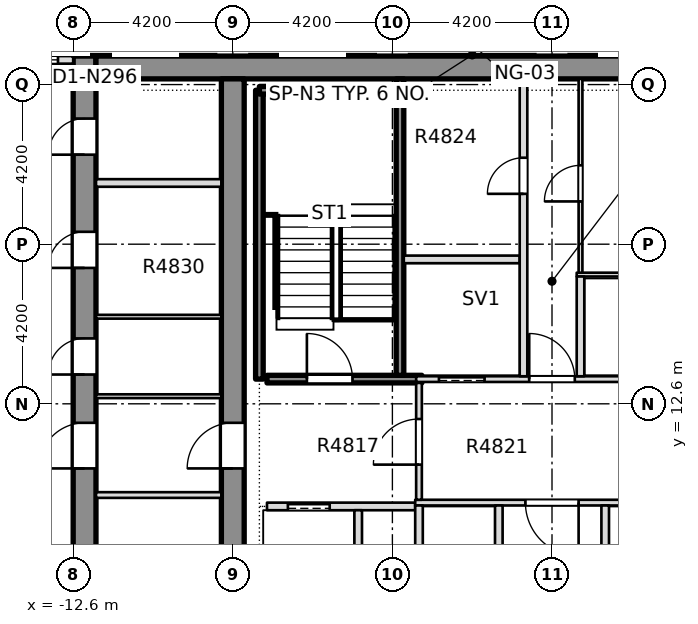
"""IFC4 building model, lengths in metres.
Left out: names, types, materials, properties, quantities, classifications, styles, units other than length and angle.
Written with IfcOpenShell. Run it as: python <this file> out.ifc"""

import sys

from ifc_helpers import new_model, si_unit, direction, frame, frame_2d, origin, place, context, subcontext, project, spatial, rectangle, extrude, element, fill, save


model = new_model("IFC4")
c1 = context("Model", 3, precision=1e-05, world=origin(), true_north=direction((0.0, 1.0)))
c2 = subcontext(c1, "Body", "Model", "MODEL_VIEW")
j1 = project(units=[si_unit("LENGTHUNIT", "METRE"), si_unit("PLANEANGLEUNIT", "RADIAN")], contexts=[c1])
p1 = place(None, origin())
s1 = spatial("IfcSite", under=j1, at=p1, CompositionType="ELEMENT")
p2 = place(p1, origin())
s2 = spatial("IfcBuilding", under=s1, at=p2, CompositionType="ELEMENT")
p3 = place(p2, frame((0.0, 0.0, 185.9)))
s3 = spatial("IfcBuildingStorey", under=s2, at=p3, CompositionType="ELEMENT", Elevation=185.9)
p4 = place(p3, frame((-12.3, -8.4, -0.4), z_axis=(0.0, 0.0, 1.0), x_axis=(0.0, 1.0, 0.0)))
e1 = element("IfcWall", 1, at=p4, inside=s3, PredefinedType="SHEAR", context=c2, shape_type="SweptSolid", body=[
    extrude(rectangle(XDim=30.15, YDim=0.6, at=frame_2d((15.075, 0.0))), origin(), (0.0, 0.0, 1.0), 3.45),
])
p5 = place(p4, frame((4.788, 0.0, 0.4)))
e2 = element("IfcOpeningElement", 2, at=p5, cuts=e1, PredefinedType="OPENING", context=c2, shape_type="SweptSolid", body=[
    extrude(rectangle(XDim=0.95, YDim=2.1, at=frame_2d((0.475, 1.05))), frame((0.0, 0.31, 0.0), z_axis=(0.0, -1.0, 0.0), x_axis=(1.0, 0.0, 0.0)), (0.0, 0.0, 1.0), 0.62),
])
p6 = place(p4, frame((13.638, 0.0, 0.4)))
e3 = element("IfcOpeningElement", 3, at=p6, cuts=e1, PredefinedType="OPENING", context=c2, shape_type="SweptSolid", body=[
    extrude(rectangle(XDim=0.95, YDim=2.1, at=frame_2d((0.475, 1.05))), frame((0.0, 0.31, 0.0), z_axis=(0.0, -1.0, 0.0), x_axis=(1.0, 0.0, 0.0)), (0.0, 0.0, 1.0), 0.62),
])
p7 = place(p4, frame((21.771, 0.0, 0.4)))
e4 = element("IfcOpeningElement", 4, at=p7, cuts=e1, PredefinedType="OPENING", context=c2, shape_type="SweptSolid", body=[
    extrude(rectangle(XDim=0.95, YDim=2.1, at=frame_2d((0.475, 1.05))), frame((0.0, 0.31, 0.0), z_axis=(0.0, -1.0, 0.0), x_axis=(1.0, 0.0, 0.0)), (0.0, 0.0, 1.0), 0.62),
])
p8 = place(p4, frame((24.576, 0.0, 0.4)))
e5 = element("IfcOpeningElement", 5, at=p8, cuts=e1, PredefinedType="OPENING", context=c2, shape_type="SweptSolid", body=[
    extrude(rectangle(XDim=0.95, YDim=2.1, at=frame_2d((0.475, 1.05))), frame((0.0, 0.31, 0.0), z_axis=(0.0, -1.0, 0.0), x_axis=(1.0, 0.0, 0.0)), (0.0, 0.0, 1.0), 0.62),
])
p9 = place(p4, frame((27.555, 0.0, 0.4)))
e6 = element("IfcOpeningElement", 6, at=p9, cuts=e1, PredefinedType="OPENING", context=c2, shape_type="SweptSolid", body=[
    extrude(rectangle(XDim=0.95, YDim=2.1, at=frame_2d((0.475, 1.05))), frame((0.0, 0.31, 0.0), z_axis=(0.0, -1.0, 0.0), x_axis=(1.0, 0.0, 0.0)), (0.0, 0.0, 1.0), 0.62),
])
p10 = place(p4, frame((19.3, 0.0, 0.4)))
e7 = element("IfcOpeningElement", 7, at=p10, cuts=e1, PredefinedType="OPENING", context=c2, shape_type="SweptSolid", body=[
    extrude(rectangle(XDim=1.2, YDim=2.1, at=frame_2d((0.6, 1.05))), frame((0.0, 0.31, 0.0), z_axis=(0.0, -1.0, 0.0), x_axis=(1.0, 0.0, 0.0)), (0.0, 0.0, 1.0), 0.62),
])
p11 = place(p3, frame((-12.0, 21.45, -0.4), z_axis=(0.0, 0.0, 1.0), x_axis=(1.0, 0.0, 0.0)))
e8 = element("IfcWall", 8, at=p11, inside=s3, PredefinedType="SHEAR", context=c2, shape_type="SweptSolid", body=[
    extrude(rectangle(XDim=24.0, YDim=0.6, at=frame_2d((12.0, 0.0))), origin(), (0.0, 0.0, 1.0), 3.45),
])
p12 = place(p3, frame((-8.4, -7.8, -0.4), z_axis=(0.0, 0.0, 1.0), x_axis=(0.0, 1.0, 0.0)))
e9 = element("IfcWall", 9, at=p12, inside=s3, PredefinedType="SHEAR", context=c2, shape_type="SweptSolid", body=[
    extrude(rectangle(XDim=28.95, YDim=0.6, at=frame_2d((14.475, 0.0))), origin(), (0.0, 0.0, 1.0), 3.45),
])
p13 = place(p12, frame((18.7, 0.0, 0.4)))
e10 = element("IfcOpeningElement", 10, at=p13, cuts=e9, PredefinedType="OPENING", context=c2, shape_type="SweptSolid", body=[
    extrude(rectangle(XDim=1.2, YDim=2.1, at=frame_2d((0.6, 1.05))), frame((0.0, 0.31, 0.0), z_axis=(0.0, -1.0, 0.0), x_axis=(1.0, 0.0, 0.0)), (0.0, 0.0, 1.0), 0.62),
])
p14 = place(p3, frame((-12.6, 21.65, 0.0), z_axis=(0.0, 0.0, 1.0), x_axis=(-1.0, 0.0, 0.0)))
e11 = element("IfcWall", 11, at=p14, inside=s3, PredefinedType="STANDARD", context=c2, shape_type="SweptSolid", body=[
    extrude(rectangle(XDim=3.7, YDim=0.2, at=frame_2d((1.85, 0.0))), origin(), (0.0, 0.0, 1.0), 3.05),
])
p15 = place(p14, frame((0.4, 0.0, 0.2)))
e12 = element("IfcOpeningElement", 12, at=p15, cuts=e11, PredefinedType="OPENING", context=c2, shape_type="SweptSolid", body=[
    extrude(rectangle(XDim=1.8, YDim=2.65, at=frame_2d((0.9, 1.325))), frame((0.0, 0.11, 0.0), z_axis=(0.0, -1.0, 0.0), x_axis=(1.0, 0.0, 0.0)), (0.0, 0.0, 1.0), 0.22),
])
p16 = place(p14, frame((2.3, 0.0, 0.0)))
e13 = element("IfcOpeningElement", 13, at=p16, cuts=e11, PredefinedType="OPENING", context=c2, shape_type="SweptSolid", body=[
    extrude(rectangle(XDim=1.0, YDim=2.4, at=frame_2d((0.5, 1.2))), frame((0.0, 0.11, 0.0), z_axis=(0.0, -1.0, 0.0), x_axis=(1.0, 0.0, 0.0)), (0.0, 0.0, 1.0), 0.22),
])
p17 = place(p3, frame((-7.5, 9.9, 0.0), z_axis=(0.0, 0.0, 1.0), x_axis=(1.0, 0.0, 0.0)))
e14 = element("IfcWall", 14, at=p17, inside=s3, PredefinedType="PARTITIONING", context=c2, shape_type="SweptSolid", body=[
    extrude(rectangle(XDim=3.9, YDim=0.2, at=frame_2d((1.95, 0.0))), origin(), (0.0, 0.0, 1.0), 3.05),
])
p18 = place(p17, frame((0.55, 0.0, 0.0)))
e15 = element("IfcOpeningElement", 15, at=p18, cuts=e14, PredefinedType="OPENING", context=c2, shape_type="SweptSolid", body=[
    extrude(rectangle(XDim=1.1, YDim=2.1, at=frame_2d((0.55, 1.05))), frame((0.0, 0.11, 0.0), z_axis=(0.0, -1.0, 0.0), x_axis=(1.0, 0.0, 0.0)), (0.0, 0.0, 1.0), 0.22),
])
p19 = place(p3, frame((-3.6, 10.0, 0.0), z_axis=(0.0, 0.0, 1.0), x_axis=(1.0, 0.0, 0.0)))
e16 = element("IfcWall", 16, at=p19, inside=s3, PredefinedType="PARTITIONING", context=c2, shape_type="SweptSolid", body=[
    extrude(rectangle(XDim=7.2, YDim=0.15, at=frame_2d((3.6, 0.0))), origin(), (0.0, 0.0, 1.0), 3.05),
])
p20 = place(p19, frame((2.9, 0.0, 0.0)))
e17 = element("IfcOpeningElement", 17, at=p20, cuts=e16, PredefinedType="OPENING", context=c2, shape_type="SweptSolid", body=[
    extrude(rectangle(XDim=1.4, YDim=2.1, at=frame_2d((0.7, 1.05))), frame((0.0, 0.085, 0.0), z_axis=(0.0, -1.0, 0.0), x_axis=(1.0, 0.0, 0.0)), (0.0, 0.0, 1.0), 0.17),
])
p21 = place(p3, frame((-7.5, 13.25, 0.0), z_axis=(0.0, 0.0, 1.0), x_axis=(1.0, 0.0, 0.0)))
e18 = element("IfcWall", 18, at=p21, inside=s3, PredefinedType="SOLIDWALL", context=c2, shape_type="SweptSolid", body=[
    extrude(rectangle(XDim=4.075, YDim=0.2, at=frame_2d((2.038, 0.0))), origin(), (0.0, 0.0, 1.0), 3.05),
])
p22 = place(p21, frame((1.05, 0.0, 0.0)))
e19 = element("IfcOpeningElement", 19, at=p22, cuts=e18, PredefinedType="OPENING", context=c2, shape_type="SweptSolid", body=[
    extrude(rectangle(XDim=1.2, YDim=2.1, at=frame_2d((0.6, 1.05))), frame((0.0, 0.11, 0.0), z_axis=(0.0, -1.0, 0.0), x_axis=(1.0, 0.0, 0.0)), (0.0, 0.0, 1.0), 0.22),
])
p23 = place(p3, frame((-3.575, 13.25, 0.0), z_axis=(0.0, 0.0, 1.0), x_axis=(1.0, 0.0, 0.0)))
e20 = element("IfcWall", 20, at=p23, inside=s3, PredefinedType="PARTITIONING", context=c2, shape_type="SweptSolid", body=[
    extrude(rectangle(XDim=7.15, YDim=0.15, at=frame_2d((3.575, 0.0))), origin(), (0.0, 0.0, 1.0), 3.05),
])
p24 = place(p23, frame((0.6, 0.0, 0.0)))
e21 = element("IfcOpeningElement", 21, at=p24, cuts=e20, PredefinedType="OPENING", context=c2, shape_type="SweptSolid", body=[
    extrude(rectangle(XDim=1.2, YDim=2.1, at=frame_2d((0.6, 1.05))), frame((0.0, 0.085, 0.0), z_axis=(0.0, -1.0, 0.0), x_axis=(1.0, 0.0, 0.0)), (0.0, 0.0, 1.0), 0.17),
])
p25 = place(p23, frame((5.4, 0.0, 0.0)))
e22 = element("IfcOpeningElement", 22, at=p25, cuts=e20, PredefinedType="OPENING", context=c2, shape_type="SweptSolid", body=[
    extrude(rectangle(XDim=1.1, YDim=2.1, at=frame_2d((0.55, 1.05))), frame((0.0, 0.085, 0.0), z_axis=(0.0, -1.0, 0.0), x_axis=(1.0, 0.0, 0.0)), (0.0, 0.0, 1.0), 0.17),
])
p26 = place(p23, frame((2.975, 0.0, 0.0)))
e23 = element("IfcOpeningElement", 23, at=p26, cuts=e20, PredefinedType="OPENING", context=c2, shape_type="SweptSolid", body=[
    extrude(rectangle(XDim=1.2, YDim=2.1, at=frame_2d((0.6, 1.05))), frame((0.0, 0.085, 0.0), z_axis=(0.0, -1.0, 0.0), x_axis=(1.0, 0.0, 0.0)), (0.0, 0.0, 1.0), 0.17),
])
p27 = place(p3, frame((0.65, 16.0, 0.0), z_axis=(0.0, 0.0, 1.0), x_axis=(1.0, 0.0, 0.0)))
e24 = element("IfcWall", 24, at=p27, inside=s3, PredefinedType="PARTITIONING", context=c2, shape_type="SweptSolid", body=[
    extrude(rectangle(XDim=3.45, YDim=0.1, at=frame_2d((1.725, 0.0))), origin(), (0.0, 0.0, 1.0), 3.05),
])
p28 = place(p3, frame((-3.9, 16.4, 0.0), z_axis=(0.0, 0.0, 1.0), x_axis=(1.0, 0.0, 0.0)))
e25 = element("IfcWall", 25, at=p28, inside=s3, PredefinedType="PARTITIONING", context=c2, shape_type="SweptSolid", body=[
    extrude(rectangle(XDim=3.05, YDim=0.2, at=frame_2d((1.525, 0.0))), origin(), (0.0, 0.0, 1.0), 3.05),
])
p29 = place(p3, frame((-5.1, 7.075, 0.0), z_axis=(0.0, 0.0, 1.0), x_axis=(0.0, 1.0, 0.0)))
e26 = element("IfcWall", 26, at=p29, inside=s3, PredefinedType="PARTITIONING", context=c2, shape_type="SweptSolid", body=[
    extrude(rectangle(XDim=2.725, YDim=0.2, at=frame_2d((1.363, 0.0))), origin(), (0.0, 0.0, 1.0), 3.05),
])
p30 = place(p3, frame((-4.0, 13.35, 0.0), z_axis=(0.0, 0.0, 1.0), x_axis=(0.0, 1.0, 0.0)))
e27 = element("IfcWall", 27, at=p30, inside=s3, PredefinedType="SOLIDWALL", context=c2, shape_type="SweptSolid", body=[
    extrude(rectangle(XDim=7.799, YDim=0.2, at=frame_2d((3.899, 0.0))), origin(), (0.0, 0.0, 1.0), 3.05),
])
p31 = place(p3, frame((-3.5, 7.075, 0.0), z_axis=(0.0, 0.0, 1.0), x_axis=(0.0, 1.0, 0.0)))
e28 = element("IfcWall", 28, at=p31, inside=s3, PredefinedType="PARTITIONING", context=c2, shape_type="SweptSolid", body=[
    extrude(rectangle(XDim=2.85, YDim=0.2, at=frame_2d((1.425, 0.0))), origin(), (0.0, 0.0, 1.0), 3.05),
])
p32 = place(p3, frame((-3.5, 10.075, 0.0), z_axis=(0.0, 0.0, 1.0), x_axis=(0.0, 1.0, 0.0)))
e29 = element("IfcWall", 29, at=p32, inside=s3, PredefinedType="PARTITIONING", context=c2, shape_type="SweptSolid", body=[
    extrude(rectangle(XDim=3.075, YDim=0.15, at=frame_2d((1.538, 0.0))), origin(), (0.0, 0.0, 1.0), 3.05),
])
p33 = place(p32, frame((0.925, 0.0, 0.0)))
e30 = element("IfcOpeningElement", 30, at=p33, cuts=e29, PredefinedType="OPENING", context=c2, shape_type="SweptSolid", body=[
    extrude(rectangle(XDim=1.2, YDim=2.1, at=frame_2d((0.6, 1.05))), frame((0.0, 0.085, 0.0), z_axis=(0.0, -1.0, 0.0), x_axis=(1.0, 0.0, 0.0)), (0.0, 0.0, 1.0), 0.17),
])
p34 = place(p3, frame((-1.4, 7.075, 0.0), z_axis=(0.0, 0.0, 1.0), x_axis=(0.0, 1.0, 0.0)))
e31 = element("IfcWall", 31, at=p34, inside=s3, PredefinedType="PARTITIONING", context=c2, shape_type="SweptSolid", body=[
    extrude(rectangle(XDim=2.85, YDim=0.2, at=frame_2d((1.425, 0.0))), origin(), (0.0, 0.0, 1.0), 3.05),
])
p35 = place(p3, frame((-0.75, 13.325, 0.0), z_axis=(0.0, 0.0, 1.0), x_axis=(0.0, 1.0, 0.0)))
e32 = element("IfcWall", 32, at=p35, inside=s3, PredefinedType="PARTITIONING", context=c2, shape_type="SweptSolid", body=[
    extrude(rectangle(XDim=7.824, YDim=0.2, at=frame_2d((3.912, 0.0))), origin(), (0.0, 0.0, 1.0), 3.05),
])
p36 = place(p35, frame((4.8, 0.0, 0.0)))
e33 = element("IfcOpeningElement", 33, at=p36, cuts=e32, PredefinedType="OPENING", context=c2, shape_type="SweptSolid", body=[
    extrude(rectangle(XDim=0.95, YDim=2.1, at=frame_2d((0.475, 1.05))), frame((0.0, 0.11, 0.0), z_axis=(0.0, -1.0, 0.0), x_axis=(1.0, 0.0, 0.0)), (0.0, 0.0, 1.0), 0.22),
])
p37 = place(p3, frame((0.75, 13.325, 0.0), z_axis=(0.0, 0.0, 1.0), x_axis=(0.0, 1.0, 0.0)))
e34 = element("IfcWall", 34, at=p37, inside=s3, PredefinedType="PARTITIONING", context=c2, shape_type="SweptSolid", body=[
    extrude(rectangle(XDim=2.625, YDim=0.2, at=frame_2d((1.312, 0.0))), origin(), (0.0, 0.0, 1.0), 3.05),
])
p38 = place(p3, frame((0.75, 16.05, 0.0), z_axis=(0.0, 0.0, 1.0), x_axis=(0.0, 1.0, 0.0)))
e35 = element("IfcWall", 35, at=p38, inside=s3, PredefinedType="PARTITIONING", context=c2, shape_type="SweptSolid", body=[
    extrude(rectangle(XDim=5.099, YDim=0.1, at=frame_2d((2.549, 0.0))), origin(), (0.0, 0.0, 1.0), 3.05),
])
p39 = place(p38, frame((1.875, 0.0, 0.0)))
e36 = element("IfcOpeningElement", 36, at=p39, cuts=e35, PredefinedType="OPENING", context=c2, shape_type="SweptSolid", body=[
    extrude(rectangle(XDim=0.95, YDim=2.1, at=frame_2d((0.475, 1.05))), frame((0.0, 0.06, 0.0), z_axis=(0.0, -1.0, 0.0), x_axis=(1.0, 0.0, 0.0)), (0.0, 0.0, 1.0), 0.12),
])
p40 = place(p3, frame((1.4, 7.075, 0.0), z_axis=(0.0, 0.0, 1.0), x_axis=(0.0, 1.0, 0.0)))
e37 = element("IfcWall", 37, at=p40, inside=s3, PredefinedType="PARTITIONING", context=c2, shape_type="SweptSolid", body=[
    extrude(rectangle(XDim=2.85, YDim=0.2, at=frame_2d((1.425, 0.0))), origin(), (0.0, 0.0, 1.0), 3.05),
])
p41 = place(p3, frame((-11.999, 10.2, 0.0), z_axis=(0.0, 0.0, 1.0), x_axis=(1.0, 0.0, 0.0)))
e38 = element("IfcWall", 38, at=p41, inside=s3, PredefinedType="PARTITIONING", context=c2, shape_type="SweptSolid", body=[
    extrude(rectangle(XDim=3.298, YDim=0.15, at=frame_2d((1.649, 0.0))), origin(), (0.0, 0.0, 1.0), 3.05),
])
for number, where, z_axis, x_axis in (
    (39, (-11.999, 12.8, 0.0), (0.0, 0.0, 1.0), (1.0, 0.0, 0.0)),
    (40, (-11.999, 14.891, 0.0), (0.0, 0.0, 1.0), (1.0, 0.0, 0.0)),
):
    element("IfcWall", number, at=place(p3, frame(where, z_axis=z_axis, x_axis=x_axis)), inside=s3, PredefinedType="PARTITIONING", context=c2, shape_type="SweptSolid", body=[
        extrude(rectangle(XDim=3.298, YDim=0.1, at=frame_2d((1.649, 0.0))), origin(), (0.0, 0.0, 1.0), 3.05),
    ])
p42 = place(p3, frame((-11.999, 18.411, 0.0), z_axis=(0.0, 0.0, 1.0), x_axis=(1.0, 0.0, 0.0)))
e41 = element("IfcWall", 41, at=p42, inside=s3, PredefinedType="PARTITIONING", context=c2, shape_type="SweptSolid", body=[
    extrude(rectangle(XDim=3.298, YDim=0.2, at=frame_2d((1.649, 0.0))), origin(), (0.0, 0.0, 1.0), 3.05),
])
p43 = place(p3, frame((-7.7, 13.25, 0.0), z_axis=(0.0, 0.0, 1.0), x_axis=(0.0, 1.0, 0.0)))
e42 = element("IfcWall", 42, at=p43, inside=s3, PredefinedType="SOLIDWALL", context=c2, shape_type="SweptSolid", body=[
    extrude(rectangle(XDim=7.6, YDim=0.2, at=frame_2d((3.8, 0.0))), origin(), (0.0, 0.0, 1.0), 3.05),
])
p44 = place(p3, frame((-7.7, 20.85, 0.0), z_axis=(0.0, 0.0, 1.0), x_axis=(1.0, 0.0, 0.0)))
e43 = element("IfcWall", 43, at=p44, inside=s3, PredefinedType="SOLIDWALL", context=c2, shape_type="SweptSolid", body=[
    extrude(rectangle(XDim=3.55, YDim=0.2, at=frame_2d((1.775, 0.0))), origin(), (0.0, 0.0, 1.0), 3.05),
])
p45 = place(p15, origin())
e44 = element("IfcWindow", 44, at=p45, inside=s3, PartitioningType="SINGLE_PANEL", PredefinedType="WINDOW", context=c2, shape_type="SweptSolid", body=[
    extrude(rectangle(XDim=1.8, YDim=2.65, at=frame_2d((0.9, 1.325))), frame((0.0, 0.03, 0.0), z_axis=(0.0, -1.0, 0.0), x_axis=(1.0, 0.0, 0.0)), (0.0, 0.0, 1.0), 0.06),
])
fill(e12, e44)
p46 = place(p22, origin())
e45 = element("IfcDoor", 45, at=p46, inside=s3, OperationType="SINGLE_SWING_LEFT", PredefinedType="DOOR", context=c2, shape_type="SweptSolid", body=[
    extrude(rectangle(XDim=1.2, YDim=2.1, at=frame_2d((0.6, 1.05))), frame((0.0, 0.025, 0.0), z_axis=(0.0, -1.0, 0.0), x_axis=(1.0, 0.0, 0.0)), (0.0, 0.0, 1.0), 0.05),
])
fill(e19, e45)
p47 = place(p18, origin())
e46 = element("IfcDoor", 46, at=p47, inside=s3, OperationType="SLIDING_TO_RIGHT", PredefinedType="DOOR", context=c2, shape_type="SweptSolid", body=[
    extrude(rectangle(XDim=1.1, YDim=2.1, at=frame_2d((0.55, 1.05))), frame((0.0, 0.025, 0.0), z_axis=(0.0, -1.0, 0.0), x_axis=(1.0, 0.0, 0.0)), (0.0, 0.0, 1.0), 0.05),
])
fill(e15, e46)
p48 = place(p20, origin())
e47 = element("IfcDoor", 47, at=p48, inside=s3, OperationType="SINGLE_SWING_RIGHT", PredefinedType="DOOR", context=c2, shape_type="SweptSolid", body=[
    extrude(rectangle(XDim=1.4, YDim=2.1, at=frame_2d((0.7, 1.05))), frame((0.0, 0.025, 0.0), z_axis=(0.0, -1.0, 0.0), x_axis=(1.0, 0.0, 0.0)), (0.0, 0.0, 1.0), 0.05),
])
fill(e17, e47)
p49 = place(p24, origin())
e48 = element("IfcDoor", 48, at=p49, inside=s3, OperationType="SLIDING_TO_RIGHT", PredefinedType="DOOR", context=c2, shape_type="SweptSolid", body=[
    extrude(rectangle(XDim=1.2, YDim=2.1, at=frame_2d((0.6, 1.05))), frame((0.0, 0.025, 0.0), z_axis=(0.0, -1.0, 0.0), x_axis=(1.0, 0.0, 0.0)), (0.0, 0.0, 1.0), 0.05),
])
fill(e21, e48)
p50 = place(p26, origin())
e49 = element("IfcDoor", 49, at=p50, inside=s3, OperationType="SINGLE_SWING_RIGHT", PredefinedType="DOOR", context=c2, shape_type="SweptSolid", body=[
    extrude(rectangle(XDim=1.2, YDim=2.1, at=frame_2d((0.6, 1.05))), frame((0.0, 0.025, 0.0), z_axis=(0.0, -1.0, 0.0), x_axis=(1.0, 0.0, 0.0)), (0.0, 0.0, 1.0), 0.05),
])
fill(e23, e49)
p51 = place(p36, origin())
e50 = element("IfcDoor", 50, at=p51, inside=s3, OperationType="SINGLE_SWING_RIGHT", PredefinedType="DOOR", context=c2, shape_type="SweptSolid", body=[
    extrude(rectangle(XDim=0.95, YDim=2.1, at=frame_2d((0.475, 1.05))), frame((0.0, 0.025, 0.0), z_axis=(0.0, -1.0, 0.0), x_axis=(1.0, 0.0, 0.0)), (0.0, 0.0, 1.0), 0.05),
])
fill(e33, e50)
p52 = place(p39, origin())
e51 = element("IfcDoor", 51, at=p52, inside=s3, OperationType="SINGLE_SWING_LEFT", PredefinedType="DOOR", context=c2, shape_type="SweptSolid", body=[
    extrude(rectangle(XDim=0.95, YDim=2.1, at=frame_2d((0.475, 1.05))), frame((0.0, 0.025, 0.0), z_axis=(0.0, -1.0, 0.0), x_axis=(1.0, 0.0, 0.0)), (0.0, 0.0, 1.0), 0.05),
])
fill(e36, e51)
p53 = place(p33, origin())
e52 = element("IfcDoor", 52, at=p53, inside=s3, OperationType="SINGLE_SWING_RIGHT", PredefinedType="DOOR", context=c2, shape_type="SweptSolid", body=[
    extrude(rectangle(XDim=1.2, YDim=2.1, at=frame_2d((0.6, 1.05))), frame((0.0, 0.025, 0.0), z_axis=(0.0, -1.0, 0.0), x_axis=(1.0, 0.0, 0.0)), (0.0, 0.0, 1.0), 0.05),
])
fill(e30, e52)
p54 = place(p7, origin())
e53 = element("IfcDoor", 53, at=p54, inside=s3, OperationType="SINGLE_SWING_LEFT", PredefinedType="DOOR", context=c2, shape_type="SweptSolid", body=[
    extrude(rectangle(XDim=0.95, YDim=2.1, at=frame_2d((0.475, 1.05))), frame((0.0, 0.025, 0.0), z_axis=(0.0, -1.0, 0.0), x_axis=(1.0, 0.0, 0.0)), (0.0, 0.0, 1.0), 0.05),
])
fill(e4, e53)
p55 = place(p8, origin())
e54 = element("IfcDoor", 54, at=p55, inside=s3, OperationType="SINGLE_SWING_LEFT", PredefinedType="DOOR", context=c2, shape_type="SweptSolid", body=[
    extrude(rectangle(XDim=0.95, YDim=2.1, at=frame_2d((0.475, 1.05))), frame((0.0, 0.025, 0.0), z_axis=(0.0, -1.0, 0.0), x_axis=(1.0, 0.0, 0.0)), (0.0, 0.0, 1.0), 0.05),
])
fill(e5, e54)
p56 = place(p9, origin())
e55 = element("IfcDoor", 55, at=p56, inside=s3, OperationType="SINGLE_SWING_LEFT", PredefinedType="DOOR", context=c2, shape_type="SweptSolid", body=[
    extrude(rectangle(XDim=0.95, YDim=2.1, at=frame_2d((0.475, 1.05))), frame((0.0, 0.025, 0.0), z_axis=(0.0, -1.0, 0.0), x_axis=(1.0, 0.0, 0.0)), (0.0, 0.0, 1.0), 0.05),
])
fill(e6, e55)
p57 = place(p10, origin())
e56 = element("IfcDoor", 56, at=p57, inside=s3, OperationType="SINGLE_SWING_LEFT", PredefinedType="DOOR", context=c2, shape_type="SweptSolid", body=[
    extrude(rectangle(XDim=1.2, YDim=2.1, at=frame_2d((0.6, 1.05))), frame((0.0, 0.025, 0.0), z_axis=(0.0, -1.0, 0.0), x_axis=(1.0, 0.0, 0.0)), (0.0, 0.0, 1.0), 0.05),
])
fill(e7, e56)
p58 = place(p13, origin())
e57 = element("IfcDoor", 57, at=p58, inside=s3, OperationType="SINGLE_SWING_LEFT", PredefinedType="DOOR", context=c2, shape_type="SweptSolid", body=[
    extrude(rectangle(XDim=1.2, YDim=2.1, at=frame_2d((0.6, 1.05))), frame((0.0, 0.025, 0.0), z_axis=(0.0, -1.0, 0.0), x_axis=(1.0, 0.0, 0.0)), (0.0, 0.0, 1.0), 0.05),
])
fill(e10, e57)
save(model, sys.argv[1])
